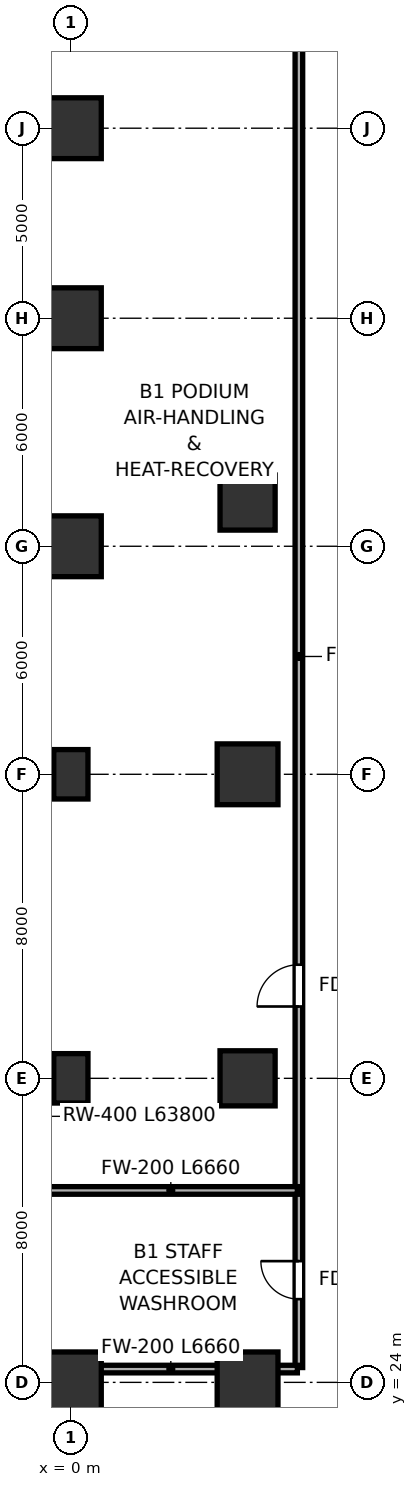
"""IFC4 building model, lengths in metres.
Left out: names, types, materials, properties, quantities, classifications, styles, units other than length and angle.
Written with IfcOpenShell. Run it as: python <this file> out.ifc"""

import sys

from ifc_helpers import new_model, si_unit, direction, frame, frame_2d, origin, origin_2d, place, context, subcontext, project, spatial, rectangle, extrude, source, transform, mapped, element, fill, save


model = new_model("IFC4")
c1 = context("Model", 3, precision=1e-05, world=origin(), true_north=direction((0.0, 1.0)))
c2 = subcontext(c1, "Body", "Model", "MODEL_VIEW")
j1 = project(units=[si_unit("LENGTHUNIT", "METRE"), si_unit("PLANEANGLEUNIT", "RADIAN")], contexts=[c1])
p1 = place(None, origin())
s1 = spatial("IfcSite", under=j1, at=p1, CompositionType="ELEMENT")
p2 = place(p1, origin())
s2 = spatial("IfcBuilding", under=s1, at=p2, CompositionType="ELEMENT")
p3 = place(p2, frame((0.0, 0.0, -4.8)))
s3 = spatial("IfcBuildingStorey", under=s2, at=p3, CompositionType="ELEMENT", Elevation=-4.8)
m1 = source(origin(), c2, "Body", "SweptSolid", [
    extrude(rectangle(XDim=1.6, YDim=1.6, at=origin_2d()), origin(), (0.0, 0.0, 1.0), 4.799),
])
p4 = place(p3, frame((0.0, 24.0, 0.001), z_axis=(0.0, 0.0, 1.0), x_axis=(1.0, 0.0, 0.0)))
e1 = element("IfcColumn", 1, at=p4, inside=s3, PredefinedType="COLUMN", context=c2, shape_type="MappedRepresentation", body=[
    mapped(m1, transform((0.0, 0.0, 0.0), scale=1.0)),
])
m2 = source(origin(), c2, "Body", "SweptSolid", [
    extrude(rectangle(XDim=0.9, YDim=1.3, at=origin_2d()), origin(), (0.0, 0.0, 1.0), 4.799),
])
for number, where, z_axis, x_axis in (
    (2, (0.0, 32.0, 0.001), (0.0, 0.0, 1.0), (1.0, 0.0, 0.0)),
    (3, (0.0, 40.0, 0.001), (0.0, 0.0, 1.0), (1.0, 0.0, 0.0)),
):
    element("IfcColumn", number, at=place(p3, frame(where, z_axis=z_axis, x_axis=x_axis)), inside=s3, PredefinedType="PILASTER", context=c2, shape_type="MappedRepresentation", body=[
        mapped(m2, transform((0.0, 0.0, 0.0), scale=1.0)),
    ])
for number, where, z_axis, x_axis in (
    (4, (0.0, 46.0, 0.001), (0.0, 0.0, 1.0), (1.0, 0.0, 0.0)),
    (5, (0.0, 52.0, 0.001), (0.0, 0.0, 1.0), (1.0, 0.0, 0.0)),
):
    element("IfcColumn", number, at=place(p3, frame(where, z_axis=z_axis, x_axis=x_axis)), inside=s3, PredefinedType="COLUMN", context=c2, shape_type="MappedRepresentation", body=[
        mapped(m1, transform((0.0, 0.0, 0.0), scale=1.0)),
    ])
m3 = source(origin(), c2, "Body", "SweptSolid", [
    extrude(rectangle(XDim=1.6, YDim=1.6, at=origin_2d()), origin(), (0.0, 0.0, 1.0), 4.599),
])
p5 = place(p3, frame((0.0, 57.0, 0.001), z_axis=(0.0, 0.0, 1.0), x_axis=(1.0, 0.0, 0.0)))
e6 = element("IfcColumn", 6, at=p5, inside=s3, PredefinedType="COLUMN", context=c2, shape_type="MappedRepresentation", body=[
    mapped(m3, transform((0.0, 0.0, 0.0), scale=1.0)),
])
m4 = source(origin(), c2, "Body", "SweptSolid", [
    extrude(rectangle(XDim=1.6, YDim=1.6, at=origin_2d()), origin(), (0.0, 0.0, 1.0), 4.799),
])
p6 = place(p3, frame((4.65, 24.0, 0.001), z_axis=(0.0, 0.0, 1.0), x_axis=(1.0, 0.0, 0.0)))
e7 = element("IfcColumn", 7, at=p6, inside=s3, PredefinedType="COLUMN", context=c2, shape_type="MappedRepresentation", body=[
    mapped(m4, transform((0.0, 0.0, 0.0), scale=1.0)),
])
m5 = source(origin(), c2, "Body", "SweptSolid", [
    extrude(rectangle(XDim=1.45, YDim=1.45, at=origin_2d()), origin(), (0.0, 0.0, 1.0), 4.799),
])
p7 = place(p3, frame((4.65, 32.0, 0.001), z_axis=(0.0, 0.0, 1.0), x_axis=(1.0, 0.0, 0.0)))
e8 = element("IfcColumn", 8, at=p7, inside=s3, PredefinedType="COLUMN", context=c2, shape_type="MappedRepresentation", body=[
    mapped(m5, transform((0.0, 0.0, 0.0), scale=1.0)),
])
p8 = place(p3, frame((4.65, 40.0, 0.001), z_axis=(0.0, 0.0, 1.0), x_axis=(1.0, 0.0, 0.0)))
e9 = element("IfcColumn", 9, at=p8, inside=s3, PredefinedType="COLUMN", context=c2, shape_type="MappedRepresentation", body=[
    mapped(m4, transform((0.0, 0.0, 0.0), scale=1.0)),
])
p9 = place(p3, frame((4.65, 47.15, 0.001), z_axis=(0.0, 0.0, 1.0), x_axis=(1.0, 0.0, 0.0)))
e10 = element("IfcColumn", 10, at=p9, inside=s3, PredefinedType="COLUMN", context=c2, shape_type="MappedRepresentation", body=[
    mapped(m5, transform((0.0, 0.0, 0.0), scale=1.0)),
])
p10 = place(p3, frame((6.0, 24.39, 0.0), z_axis=(0.0, 0.0, 1.0), x_axis=(0.0, 1.0, 0.0)))
e11 = element("IfcWall", 11, at=p10, inside=s3, PredefinedType="SOLIDWALL", context=c2, shape_type="SweptSolid", body=[
    extrude(rectangle(XDim=37.42, YDim=0.2, at=frame_2d((18.71, 0.0))), origin(), (0.0, 0.0, 1.0), 3.65),
])
p11 = place(p10, frame((1.8, 0.0, 0.0)))
e12 = element("IfcOpeningElement", 12, at=p11, cuts=e11, PredefinedType="OPENING", context=c2, shape_type="SweptSolid", body=[
    extrude(rectangle(XDim=1.0, YDim=2.15, at=frame_2d((0.5, 1.075))), frame((0.0, 0.11, 0.0), z_axis=(0.0, -1.0, 0.0), x_axis=(1.0, 0.0, 0.0)), (0.0, 0.0, 1.0), 0.22),
])
p12 = place(p10, frame((9.5, 0.0, 0.0)))
e13 = element("IfcOpeningElement", 13, at=p12, cuts=e11, PredefinedType="OPENING", context=c2, shape_type="SweptSolid", body=[
    extrude(rectangle(XDim=1.1, YDim=2.2, at=frame_2d((0.55, 1.1))), frame((0.0, 0.11, 0.0), z_axis=(0.0, -1.0, 0.0), x_axis=(1.0, 0.0, 0.0)), (0.0, 0.0, 1.0), 0.22),
])
p13 = place(p3, frame((-0.7, 24.35, 0.0), z_axis=(0.0, 0.0, 1.0), x_axis=(1.0, 0.0, 0.0)))
e14 = element("IfcWall", 14, at=p13, inside=s3, PredefinedType="SOLIDWALL", context=c2, shape_type="SweptSolid", body=[
    extrude(rectangle(XDim=6.66, YDim=0.2, at=frame_2d((3.33, 0.0))), origin(), (0.0, 0.0, 1.0), 3.65),
])
p14 = place(p3, frame((-0.7, 29.05, 0.0), z_axis=(0.0, 0.0, 1.0), x_axis=(1.0, 0.0, 0.0)))
e15 = element("IfcWall", 15, at=p14, inside=s3, PredefinedType="SOLIDWALL", context=c2, shape_type="SweptSolid", body=[
    extrude(rectangle(XDim=6.66, YDim=0.2, at=frame_2d((3.33, 0.0))), origin(), (0.0, 0.0, 1.0), 3.655),
])
m6 = source(origin(), c2, "Body", "SweptSolid", [
    extrude(rectangle(XDim=1.0, YDim=2.15, at=frame_2d((0.5, 1.075))), frame((0.0, 0.025, 0.0), z_axis=(0.0, -1.0, 0.0), x_axis=(1.0, 0.0, 0.0)), (0.0, 0.0, 1.0), 0.05),
])
p15 = place(p11, origin())
e16 = element("IfcDoor", 16, at=p15, inside=s3, OperationType="SINGLE_SWING_RIGHT", PredefinedType="DOOR", context=c2, shape_type="MappedRepresentation", body=[
    mapped(m6, transform((0.0, 0.0, 0.0), scale=1.0)),
])
fill(e12, e16)
m7 = source(origin(), c2, "Body", "SweptSolid", [
    extrude(rectangle(XDim=1.1, YDim=2.2, at=frame_2d((0.55, 1.1))), frame((0.0, 0.025, 0.0), z_axis=(0.0, -1.0, 0.0), x_axis=(1.0, 0.0, 0.0)), (0.0, 0.0, 1.0), 0.05),
])
p16 = place(p12, origin())
e17 = element("IfcDoor", 17, at=p16, inside=s3, OperationType="SINGLE_SWING_LEFT", PredefinedType="DOOR", context=c2, shape_type="MappedRepresentation", body=[
    mapped(m7, transform((0.0, 0.0, 0.0), scale=1.0)),
])
fill(e13, e17)
save(model, sys.argv[1])
